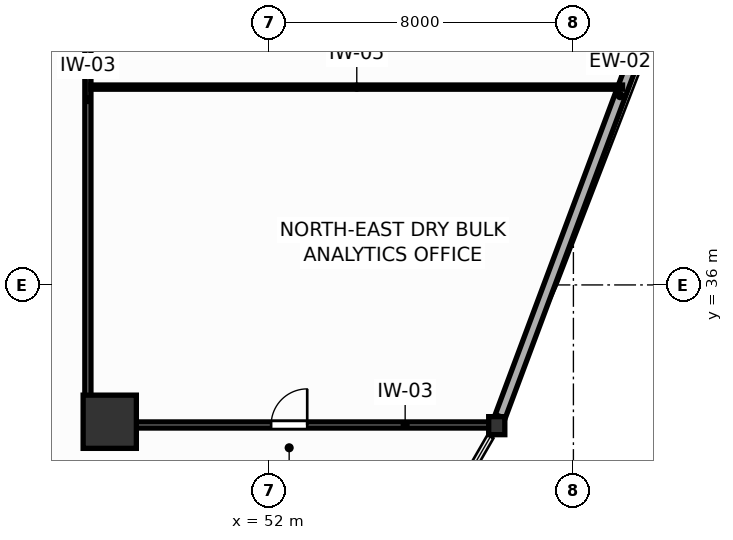
"""IFC4 building model, lengths in metres.
Left out: names, types, materials, properties, quantities, classifications, styles, units other than length and angle.
Written with IfcOpenShell. Run it as: python <this file> out.ifc"""

import sys

from ifc_helpers import new_model, si_unit, direction, frame, frame_2d, origin, origin_2d, place, context, subcontext, project, spatial, rectangle, i_section, extrude, source, transform, mapped, element, fill, save


model = new_model("IFC4")
c1 = context("Model", 3, precision=1e-05, world=origin(), true_north=direction((0.0, 1.0)))
c2 = subcontext(c1, "Body", "Model", "MODEL_VIEW")
j1 = project(units=[si_unit("LENGTHUNIT", "METRE"), si_unit("PLANEANGLEUNIT", "RADIAN")], contexts=[c1])
p1 = place(None, origin())
s1 = spatial("IfcSite", under=j1, at=p1, CompositionType="ELEMENT")
p2 = place(p1, origin())
s2 = spatial("IfcBuilding", under=s1, at=p2, CompositionType="ELEMENT")
p3 = place(p2, frame((0.0, 0.0, 55.2)))
s3 = spatial("IfcBuildingStorey", under=s2, at=p3, CompositionType="ELEMENT", Elevation=55.2)
m1 = source(origin(), c2, "Body", "SweptSolid", [
    extrude(rectangle(XDim=1.4, YDim=1.4, at=origin_2d()), origin(), (0.0, 0.0, 1.0), 3.9),
])
p4 = place(p3, frame((47.8, 32.4, 0.0), z_axis=(0.0, 0.0, 1.0), x_axis=(1.0, 0.0, 0.0)))
e1 = element("IfcColumn", 1, at=p4, inside=s3, PredefinedType="COLUMN", context=c2, shape_type="MappedRepresentation", body=[
    mapped(m1, transform((0.0, 0.0, 0.0), scale=1.0)),
])
m2 = source(origin(), c2, "Body", "SweptSolid", [
    extrude(i_section(OverallWidth=0.424, OverallDepth=0.474, WebThickness=0.045, FlangeThickness=0.072, FilletRadius=0.015, at=origin_2d()), origin(), (0.0, 0.0, 1.0), 3.9),
])
p5 = place(p3, frame((57.983, 32.297, 0.0), z_axis=(0.0, 0.0, 1.0), x_axis=(1.0, 0.0, 0.0)))
e2 = element("IfcColumn", 2, at=p5, inside=s3, PredefinedType="COLUMN", context=c2, shape_type="MappedRepresentation", body=[
    mapped(m2, transform((0.0, 0.0, 0.0), scale=1.0)),
])
p6 = place(p3, frame((58.074, 32.539, 0.0), z_axis=(0.0, 0.0, 1.0), x_axis=(0.350140465982, 0.936697205121, 0.0)))
e3 = element("IfcWall", 3, at=p6, inside=s3, PredefinedType="SOLIDWALL", context=c2, shape_type="SweptSolid", body=[
    extrude(rectangle(XDim=18.022, YDim=0.28, at=frame_2d((9.011, 0.0))), origin(), (0.0, 0.0, 1.0), 3.11),
])
p7 = place(p3, frame((47.225, 32.31, 0.0), z_axis=(0.0, 0.0, 1.0), x_axis=(0.0, 1.0, 0.0)))
e4 = element("IfcWall", 4, at=p7, inside=s3, PredefinedType="PARTITIONING", context=c2, shape_type="SweptSolid", body=[
    extrude(rectangle(XDim=23.984, YDim=0.16, at=frame_2d((11.992, 0.0))), origin(), (0.0, 0.0, 1.0), 3.56),
])
p8 = place(p7, frame((17.311, 0.0, 0.0)))
e5 = element("IfcOpeningElement", 5, at=p8, cuts=e4, PredefinedType="OPENING", context=c2, shape_type="SweptSolid", body=[
    extrude(rectangle(XDim=0.95, YDim=2.05, at=frame_2d((0.475, 1.025))), frame((0.0, 0.09, 0.0), z_axis=(0.0, -1.0, 0.0), x_axis=(1.0, 0.0, 0.0)), (0.0, 0.0, 1.0), 0.18),
])
p9 = place(p3, frame((47.307, 32.315, 0.0), z_axis=(0.0, 0.0, 1.0), x_axis=(1.0, 0.0, 0.0)))
e6 = element("IfcWall", 6, at=p9, inside=s3, PredefinedType="PARTITIONING", context=c2, shape_type="SweptSolid", body=[
    extrude(rectangle(XDim=10.663, YDim=0.16, at=frame_2d((5.332, 0.0))), origin(), (0.0, 0.0, 1.0), 3.06),
])
p10 = place(p9, frame((4.739, 0.0, 0.0)))
e7 = element("IfcOpeningElement", 7, at=p10, cuts=e6, PredefinedType="OPENING", context=c2, shape_type="SweptSolid", body=[
    extrude(rectangle(XDim=0.95, YDim=2.05, at=frame_2d((0.475, 1.025))), frame((0.0, 0.09, 0.0), z_axis=(0.0, -1.0, 0.0), x_axis=(1.0, 0.0, 0.0)), (0.0, 0.0, 1.0), 0.18),
])
p11 = place(p3, frame((47.307, 41.205, 0.0), z_axis=(0.0, 0.0, 1.0), x_axis=(1.0, 0.0, 0.0)))
e8 = element("IfcWall", 8, at=p11, inside=s3, PredefinedType="MOVABLE", context=c2, shape_type="SweptSolid", body=[
    extrude(rectangle(XDim=13.986, YDim=0.11, at=frame_2d((6.993, 0.0))), origin(), (0.0, 0.0, 1.0), 3.56),
])
p12 = place(p10, origin())
e9 = element("IfcDoor", 9, at=p12, inside=s3, OperationType="SINGLE_SWING_RIGHT", PredefinedType="DOOR", context=c2, shape_type="SweptSolid", body=[
    extrude(rectangle(XDim=0.95, YDim=2.05, at=frame_2d((0.475, 1.025))), frame((0.0, 0.025, 0.0), z_axis=(0.0, -1.0, 0.0), x_axis=(1.0, 0.0, 0.0)), (0.0, 0.0, 1.0), 0.05),
])
fill(e7, e9)
save(model, sys.argv[1])
